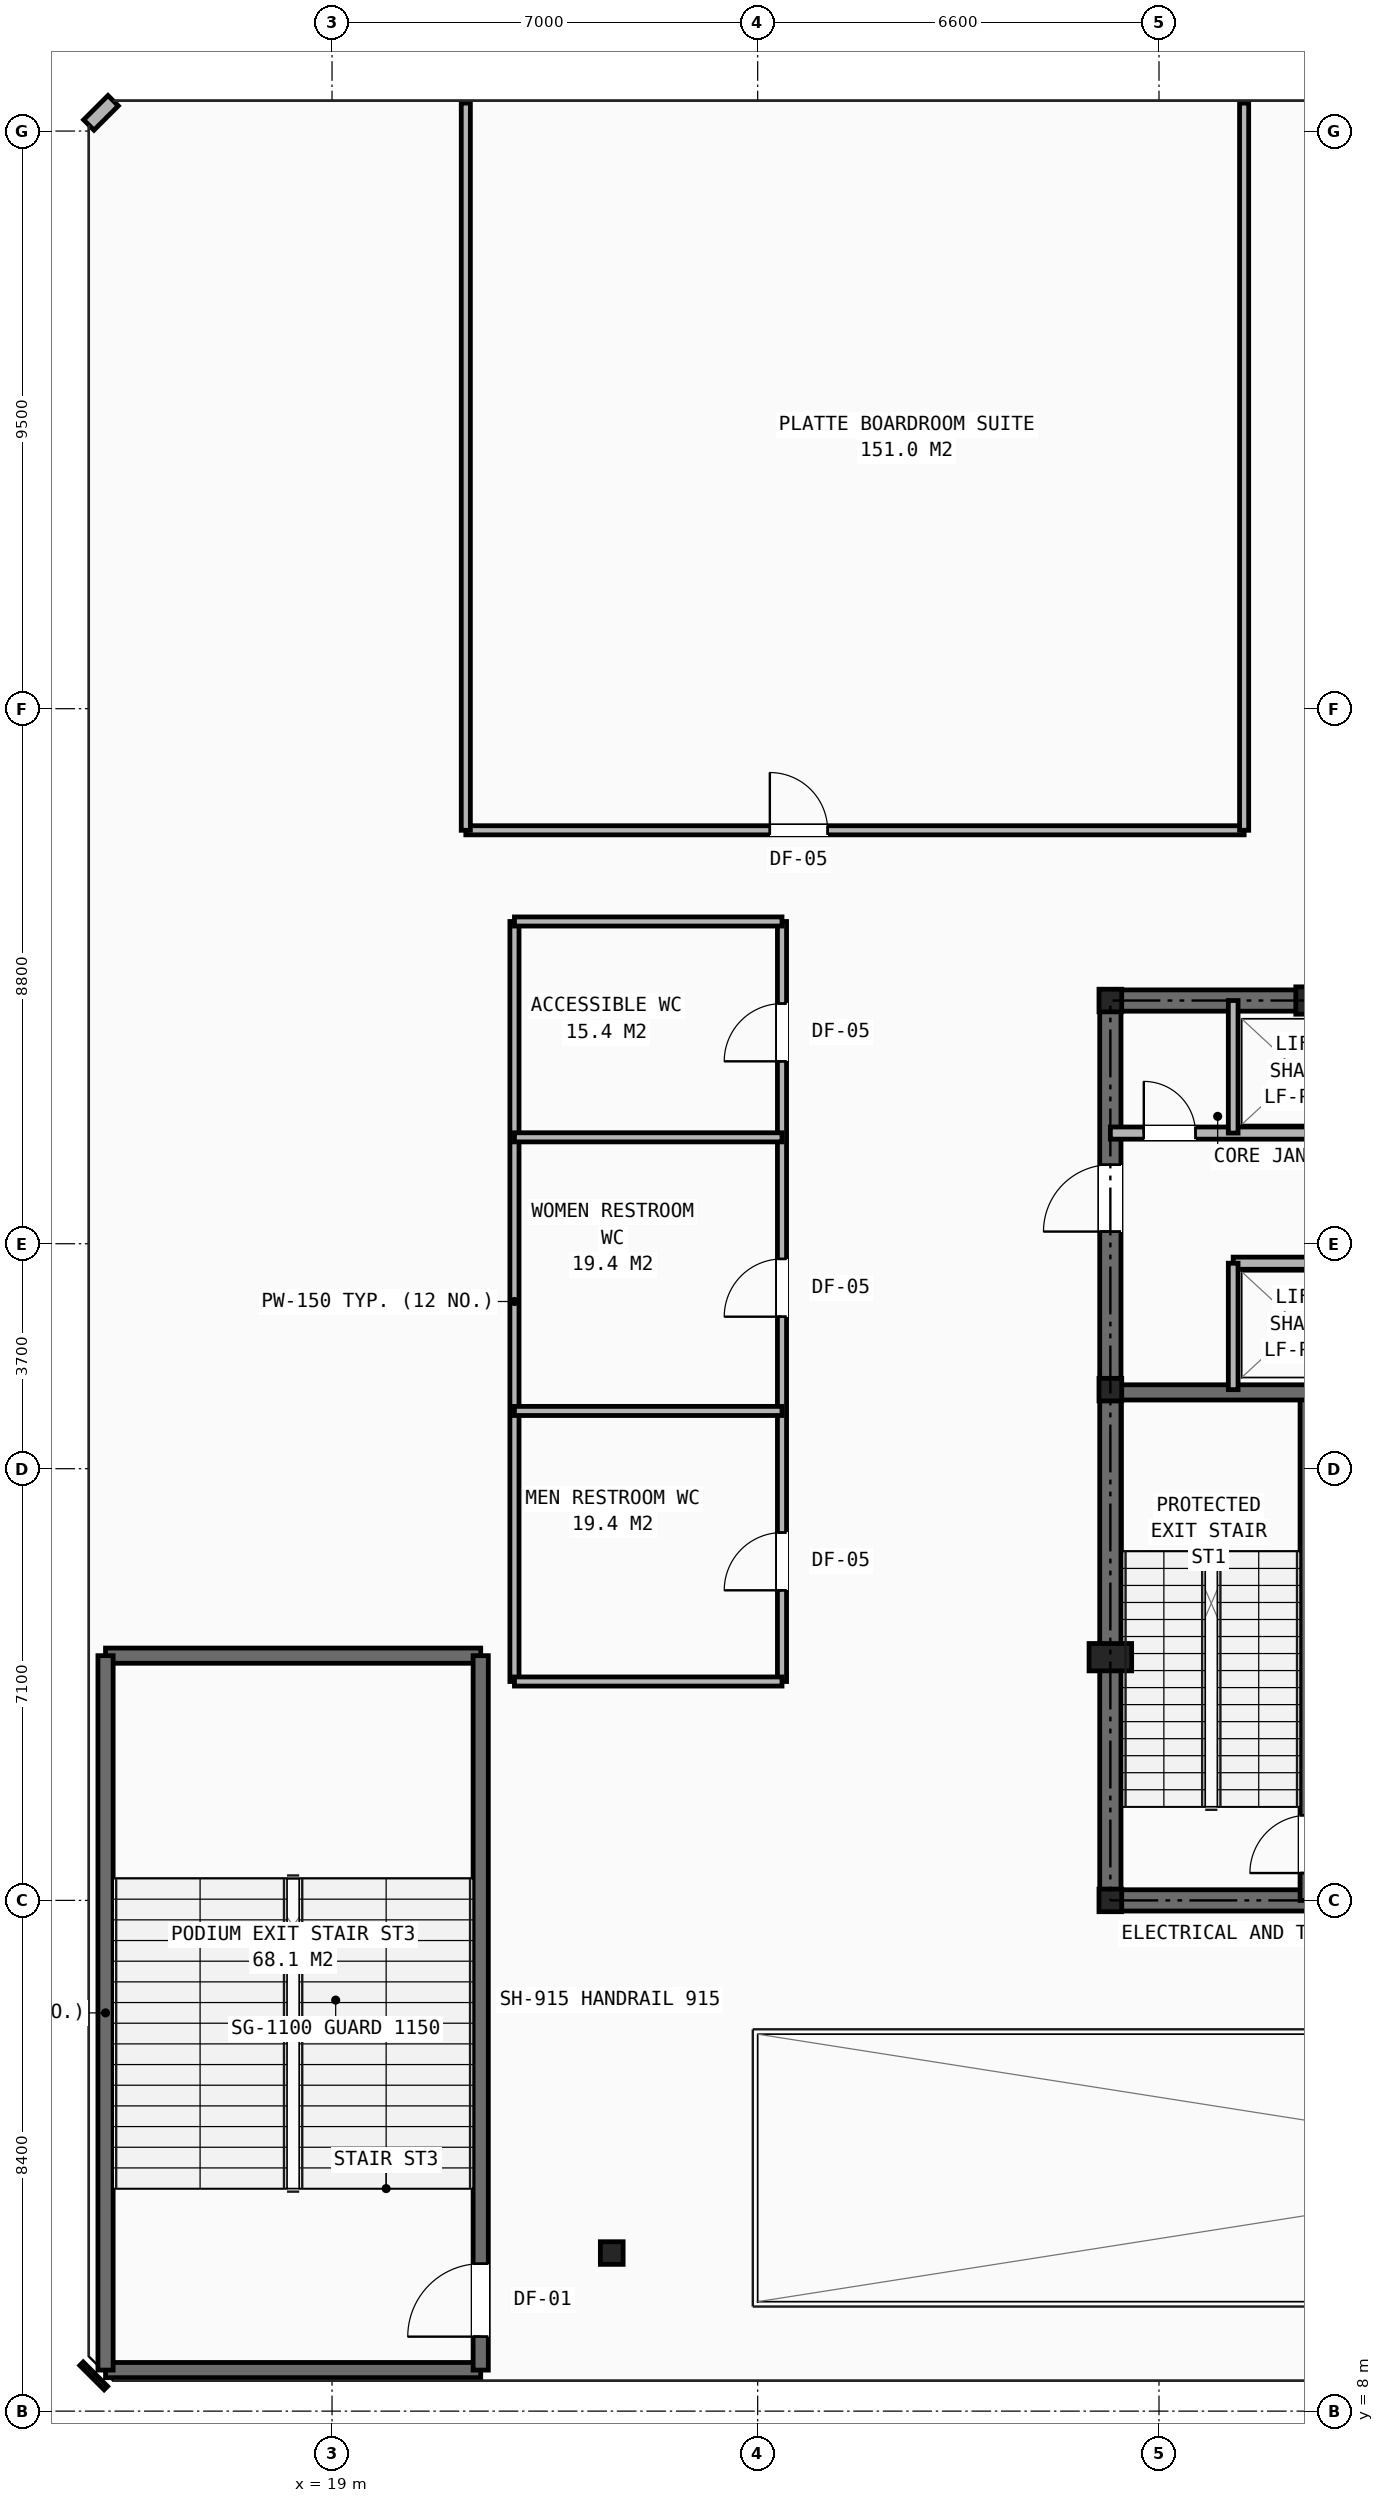
"""IFC4 building model, lengths in metres.
Left out: names, types, materials, properties, quantities, classifications, styles, units other than length and angle.
Written with IfcOpenShell. Run it as: python <this file> out.ifc"""

import sys

from ifc_helpers import new_model, si_unit, direction, frame, frame_2d, origin, origin_2d, place, context, subcontext, project, spatial, rectangle, i_section, extrude, element, fill, save


model = new_model("IFC4")
c1 = context("Model", 3, precision=1e-05, world=origin(), true_north=direction((0.0, 1.0)))
c2 = subcontext(c1, "Body", "Model", "MODEL_VIEW")
j1 = project(units=[si_unit("LENGTHUNIT", "METRE"), si_unit("PLANEANGLEUNIT", "RADIAN")], contexts=[c1])
p1 = place(None, origin())
s1 = spatial("IfcSite", under=j1, at=p1, CompositionType="ELEMENT")
p2 = place(p1, origin())
s2 = spatial("IfcBuilding", under=s1, at=p2, CompositionType="ELEMENT")
p3 = place(p2, frame((0.0, 0.0, 5.5)))
s3 = spatial("IfcBuildingStorey", under=s2, at=p3, CompositionType="ELEMENT", Elevation=5.5)
for number, where, z_axis, x_axis in (
    (1, (31.8, 16.4, 0.0), (0.0, 0.0, 1.0), (1.0, 0.0, 0.0)),
    (2, (31.8, 24.8, 0.0), (0.0, 0.0, 1.0), (1.0, 0.0, 0.0)),
    (3, (31.8, 31.2, 0.0), (0.0, 0.0, 1.0), (1.0, 0.0, 0.0)),
    (4, (23.6, 10.6, 0.0), (0.0, 0.0, 1.0), (1.0, 0.0, 0.0)),
):
    element("IfcColumn", number, at=place(p3, frame(where, z_axis=z_axis, x_axis=x_axis)), inside=s3, PredefinedType="COLUMN", context=c2, shape_type="SweptSolid", body=[
        extrude(i_section(OverallWidth=0.374, OverallDepth=0.372, WebThickness=0.016, FlangeThickness=0.026, at=origin_2d()), origin(), (0.0, 0.0, 1.0), 5.5),
    ])
for number, where, z_axis, x_axis in (
    (5, (31.8, 20.4, 0.0), (0.0, 0.0, 1.0), (1.0, 0.0, 0.0)),
    (6, (35.2, 31.2, 0.0), (0.0, 0.0, 1.0), (1.0, 0.0, 0.0)),
):
    element("IfcColumn", number, at=place(p3, frame(where, z_axis=z_axis, x_axis=x_axis)), inside=s3, PredefinedType="PILASTER", context=c2, shape_type="SweptSolid", body=[
        extrude(rectangle(XDim=0.7, YDim=0.45, at=origin_2d()), origin(), (0.0, 0.0, 1.0), 5.5),
    ])
p4 = place(p3, frame((15.4, 46.0, 0.0), z_axis=(0.0, 0.0, 1.0), x_axis=(-0.707106781187, -0.707106781187, 0.0)))
e7 = element("IfcWall", 7, at=p4, inside=s3, PredefinedType="STANDARD", context=c2, shape_type="SweptSolid", body=[
    extrude(rectangle(XDim=0.565, YDim=0.24, at=frame_2d((0.283, 0.0))), origin(), (0.0, 0.0, 1.0), 5.18),
])
p5 = place(p3, frame((14.88, 8.78, 0.0), z_axis=(0.0, 0.0, 1.0), x_axis=(0.707106781187, -0.707106781187, 0.0)))
e8 = element("IfcWall", 8, at=p5, inside=s3, PredefinedType="STANDARD", context=c2, shape_type="SweptSolid", body=[
    extrude(rectangle(XDim=0.565, YDim=0.08, at=frame_2d((0.283, 0.0))), origin(), (0.0, 0.0, 1.0), 5.18),
])
p6 = place(p3, frame((31.8, 16.4, 0.0), z_axis=(0.0, 0.0, 1.0), x_axis=(1.0, 0.0, 0.0)))
e9 = element("IfcWall", 9, at=p6, inside=s3, PredefinedType="SHEAR", context=c2, shape_type="SweptSolid", body=[
    extrude(rectangle(XDim=16.4, YDim=0.35, at=frame_2d((8.2, 0.0))), origin(), (0.0, 0.0, 1.0), 5.18),
])
p7 = place(p6, frame((7.75, 0.0, 0.0)))
e10 = element("IfcOpeningElement", 10, at=p7, cuts=e9, PredefinedType="OPENING", context=c2, shape_type="SweptSolid", body=[
    extrude(rectangle(XDim=0.9, YDim=2.1, at=frame_2d((0.45, 1.05))), frame((0.0, 0.185, 0.0), z_axis=(0.0, -1.0, 0.0), x_axis=(1.0, 0.0, 0.0)), (0.0, 0.0, 1.0), 0.37),
])
p8 = place(p6, frame((4.2, 0.0, 0.0)))
e11 = element("IfcOpeningElement", 11, at=p8, cuts=e9, PredefinedType="OPENING", context=c2, shape_type="SweptSolid", body=[
    extrude(rectangle(XDim=0.95, YDim=2.1, at=frame_2d((0.475, 1.05))), frame((0.0, 0.185, 0.0), z_axis=(0.0, -1.0, 0.0), x_axis=(1.0, 0.0, 0.0)), (0.0, 0.0, 1.0), 0.37),
])
p9 = place(p6, frame((10.6, 0.0, 0.0)))
e12 = element("IfcOpeningElement", 12, at=p9, cuts=e9, PredefinedType="OPENING", context=c2, shape_type="SweptSolid", body=[
    extrude(rectangle(XDim=0.95, YDim=2.1, at=frame_2d((0.475, 1.05))), frame((0.0, 0.185, 0.0), z_axis=(0.0, -1.0, 0.0), x_axis=(1.0, 0.0, 0.0)), (0.0, 0.0, 1.0), 0.37),
])
p10 = place(p3, frame((31.8, 31.2, 0.0), z_axis=(0.0, 0.0, 1.0), x_axis=(1.0, 0.0, 0.0)))
e13 = element("IfcWall", 13, at=p10, inside=s3, PredefinedType="SHEAR", context=c2, shape_type="SweptSolid", body=[
    extrude(rectangle(XDim=16.4, YDim=0.35, at=frame_2d((8.2, 0.0))), origin(), (0.0, 0.0, 1.0), 5.18),
])
p11 = place(p3, frame((31.8, 16.4, 0.0), z_axis=(0.0, 0.0, 1.0), x_axis=(0.0, 1.0, 0.0)))
e14 = element("IfcWall", 14, at=p11, inside=s3, PredefinedType="SHEAR", context=c2, shape_type="SweptSolid", body=[
    extrude(rectangle(XDim=14.8, YDim=0.35, at=frame_2d((7.4, 0.0))), origin(), (0.0, 0.0, 1.0), 5.18),
])
p12 = place(p11, frame((11.0, 0.0, 0.0)))
e15 = element("IfcOpeningElement", 15, at=p12, cuts=e14, PredefinedType="OPENING", context=c2, shape_type="SweptSolid", body=[
    extrude(rectangle(XDim=1.1, YDim=2.15, at=frame_2d((0.55, 1.075))), frame((0.0, 0.185, 0.0), z_axis=(0.0, -1.0, 0.0), x_axis=(1.0, 0.0, 0.0)), (0.0, 0.0, 1.0), 0.37),
])
p13 = place(p3, frame((35.045, 16.4, 0.0), z_axis=(0.0, 0.0, 1.0), x_axis=(0.0, 1.0, 0.0)))
e16 = element("IfcWall", 16, at=p13, inside=s3, PredefinedType="SHEAR", context=c2, shape_type="SweptSolid", body=[
    extrude(rectangle(XDim=8.4, YDim=0.25, at=frame_2d((4.2, 0.0))), origin(), (0.0, 0.0, 1.0), 5.18),
])
p14 = place(p13, frame((0.45, 0.0, 0.0)))
e17 = element("IfcOpeningElement", 17, at=p14, cuts=e16, PredefinedType="OPENING", context=c2, shape_type="SweptSolid", body=[
    extrude(rectangle(XDim=0.95, YDim=2.1, at=frame_2d((0.475, 1.05))), frame((0.0, 0.135, 0.0), z_axis=(0.0, -1.0, 0.0), x_axis=(1.0, 0.0, 0.0)), (0.0, 0.0, 1.0), 0.27),
])
p15 = place(p3, frame((31.8, 24.755, 0.0), z_axis=(0.0, 0.0, 1.0), x_axis=(1.0, 0.0, 0.0)))
e18 = element("IfcWall", 18, at=p15, inside=s3, PredefinedType="SHEAR", context=c2, shape_type="SweptSolid", body=[
    extrude(rectangle(XDim=3.245, YDim=0.25, at=frame_2d((1.623, 0.0))), origin(), (0.0, 0.0, 1.0), 5.18),
])
p16 = place(p3, frame((31.8, 29.02, 0.0), z_axis=(0.0, 0.0, 1.0), x_axis=(1.0, 0.0, 0.0)))
e19 = element("IfcWall", 19, at=p16, inside=s3, PredefinedType="SOLIDWALL", context=c2, shape_type="SweptSolid", body=[
    extrude(rectangle(XDim=16.4, YDim=0.2, at=frame_2d((8.2, 0.0))), origin(), (0.0, 0.0, 1.0), 4.631),
])
p17 = place(p16, frame((0.55, 0.0, 0.0)))
e20 = element("IfcOpeningElement", 20, at=p17, cuts=e19, PredefinedType="OPENING", context=c2, shape_type="SweptSolid", body=[
    extrude(rectangle(XDim=0.85, YDim=2.05, at=frame_2d((0.425, 1.025))), frame((0.0, 0.11, 0.0), z_axis=(0.0, -1.0, 0.0), x_axis=(1.0, 0.0, 0.0)), (0.0, 0.0, 1.0), 0.22),
])
p18 = place(p3, frame((33.82, 26.88, 0.0), z_axis=(0.0, 0.0, 1.0), x_axis=(1.0, 0.0, 0.0)))
e21 = element("IfcWall", 21, at=p18, inside=s3, PredefinedType="SOLIDWALL", context=c2, shape_type="SweptSolid", body=[
    extrude(rectangle(XDim=14.38, YDim=0.2, at=frame_2d((7.19, 0.0))), origin(), (0.0, 0.0, 1.0), 4.631),
])
p19 = place(p3, frame((33.82, 29.02, 0.0), z_axis=(0.0, 0.0, 1.0), x_axis=(0.0, 1.0, 0.0)))
e22 = element("IfcWall", 22, at=p19, inside=s3, PredefinedType="SOLIDWALL", context=c2, shape_type="SweptSolid", body=[
    extrude(rectangle(XDim=2.18, YDim=0.16, at=frame_2d((1.09, 0.0))), origin(), (0.0, 0.0, 1.0), 4.631),
])
p20 = place(p3, frame((33.82, 24.8, 0.0), z_axis=(0.0, 0.0, 1.0), x_axis=(0.0, 1.0, 0.0)))
e23 = element("IfcWall", 23, at=p20, inside=s3, PredefinedType="SOLIDWALL", context=c2, shape_type="SweptSolid", body=[
    extrude(rectangle(XDim=2.08, YDim=0.16, at=frame_2d((1.04, 0.0))), origin(), (0.0, 0.0, 1.0), 5.18),
])
for number, where, z_axis, x_axis in (
    (24, (15.275, 20.425, 0.0), (0.0, 0.0, 1.0), (1.0, 0.0, 0.0)),
    (25, (15.275, 8.675, 0.0), (0.0, 0.0, 1.0), (1.0, 0.0, 0.0)),
):
    element("IfcWall", number, at=place(p3, frame(where, z_axis=z_axis, x_axis=x_axis)), inside=s3, PredefinedType="SHEAR", context=c2, shape_type="SweptSolid", body=[
        extrude(rectangle(XDim=6.17, YDim=0.25, at=frame_2d((3.085, 0.0))), origin(), (0.0, 0.0, 1.0), 5.18),
    ])
p21 = place(p3, frame((15.275, 8.675, 0.0), z_axis=(0.0, 0.0, 1.0), x_axis=(0.0, 1.0, 0.0)))
e26 = element("IfcWall", 26, at=p21, inside=s3, PredefinedType="SHEAR", context=c2, shape_type="SweptSolid", body=[
    extrude(rectangle(XDim=11.75, YDim=0.25, at=frame_2d((5.875, 0.0))), origin(), (0.0, 0.0, 1.0), 5.18),
])
p22 = place(p3, frame((21.445, 8.675, 0.0), z_axis=(0.0, 0.0, 1.0), x_axis=(0.0, 1.0, 0.0)))
e27 = element("IfcWall", 27, at=p22, inside=s3, PredefinedType="SHEAR", context=c2, shape_type="SweptSolid", body=[
    extrude(rectangle(XDim=11.75, YDim=0.25, at=frame_2d((5.875, 0.0))), origin(), (0.0, 0.0, 1.0), 5.18),
])
p23 = place(p22, frame((0.55, 0.0, 0.0)))
e28 = element("IfcOpeningElement", 28, at=p23, cuts=e27, PredefinedType="OPENING", context=c2, shape_type="SweptSolid", body=[
    extrude(rectangle(XDim=1.2, YDim=2.15, at=frame_2d((0.6, 1.075))), frame((0.0, 0.135, 0.0), z_axis=(0.0, -1.0, 0.0), x_axis=(1.0, 0.0, 0.0)), (0.0, 0.0, 1.0), 0.27),
])
p24 = place(p3, frame((21.2, 34.0, 0.0), z_axis=(0.0, 0.0, 1.0), x_axis=(1.0, 0.0, 0.0)))
e29 = element("IfcWall", 29, at=p24, inside=s3, PredefinedType="PARTITIONING", context=c2, shape_type="SweptSolid", body=[
    extrude(rectangle(XDim=12.8, YDim=0.15, at=frame_2d((6.4, 0.0))), origin(), (0.0, 0.0, 1.0), 4.195),
])
p25 = place(p24, frame((5.0, 0.0, 0.0)))
e30 = element("IfcOpeningElement", 30, at=p25, cuts=e29, PredefinedType="OPENING", context=c2, shape_type="SweptSolid", body=[
    extrude(rectangle(XDim=0.95, YDim=2.1, at=frame_2d((0.475, 1.05))), frame((0.0, 0.085, 0.0), z_axis=(0.0, -1.0, 0.0), x_axis=(1.0, 0.0, 0.0)), (0.0, 0.0, 1.0), 0.17),
])
p26 = place(p3, frame((21.2, 34.0, 0.0), z_axis=(0.0, 0.0, 1.0), x_axis=(0.0, 1.0, 0.0)))
e31 = element("IfcWall", 31, at=p26, inside=s3, PredefinedType="PARTITIONING", context=c2, shape_type="SweptSolid", body=[
    extrude(rectangle(XDim=11.96, YDim=0.15, at=frame_2d((5.98, 0.0))), origin(), (0.0, 0.0, 1.0), 4.195),
])
p27 = place(p3, frame((34.0, 34.0, 0.0), z_axis=(0.0, 0.0, 1.0), x_axis=(0.0, 1.0, 0.0)))
e32 = element("IfcWall", 32, at=p27, inside=s3, PredefinedType="PARTITIONING", context=c2, shape_type="SweptSolid", body=[
    extrude(rectangle(XDim=11.96, YDim=0.15, at=frame_2d((5.98, 0.0))), origin(), (0.0, 0.0, 1.0), 4.631),
])
p28 = place(p3, frame((26.4, 20.0, 0.0), z_axis=(0.0, 0.0, 1.0), x_axis=(0.0, 1.0, 0.0)))
e33 = element("IfcWall", 33, at=p28, inside=s3, PredefinedType="PARTITIONING", context=c2, shape_type="SweptSolid", body=[
    extrude(rectangle(XDim=12.5, YDim=0.15, at=frame_2d((6.25, 0.0))), origin(), (0.0, 0.0, 1.0), 4.195),
])
p29 = place(p28, frame((1.5, 0.0, 0.0)))
e34 = element("IfcOpeningElement", 34, at=p29, cuts=e33, PredefinedType="OPENING", context=c2, shape_type="SweptSolid", body=[
    extrude(rectangle(XDim=0.95, YDim=2.1, at=frame_2d((0.475, 1.05))), frame((0.0, 0.085, 0.0), z_axis=(0.0, -1.0, 0.0), x_axis=(1.0, 0.0, 0.0)), (0.0, 0.0, 1.0), 0.17),
])
p30 = place(p28, frame((6.0, 0.0, 0.0)))
e35 = element("IfcOpeningElement", 35, at=p30, cuts=e33, PredefinedType="OPENING", context=c2, shape_type="SweptSolid", body=[
    extrude(rectangle(XDim=0.95, YDim=2.1, at=frame_2d((0.475, 1.05))), frame((0.0, 0.085, 0.0), z_axis=(0.0, -1.0, 0.0), x_axis=(1.0, 0.0, 0.0)), (0.0, 0.0, 1.0), 0.17),
])
p31 = place(p28, frame((10.2, 0.0, 0.0)))
e36 = element("IfcOpeningElement", 36, at=p31, cuts=e33, PredefinedType="OPENING", context=c2, shape_type="SweptSolid", body=[
    extrude(rectangle(XDim=0.95, YDim=2.1, at=frame_2d((0.475, 1.05))), frame((0.0, 0.085, 0.0), z_axis=(0.0, -1.0, 0.0), x_axis=(1.0, 0.0, 0.0)), (0.0, 0.0, 1.0), 0.17),
])
p32 = place(p3, frame((22.0, 20.0, 0.0), z_axis=(0.0, 0.0, 1.0), x_axis=(0.0, 1.0, 0.0)))
e37 = element("IfcWall", 37, at=p32, inside=s3, PredefinedType="PARTITIONING", context=c2, shape_type="SweptSolid", body=[
    extrude(rectangle(XDim=12.5, YDim=0.15, at=frame_2d((6.25, 0.0))), origin(), (0.0, 0.0, 1.0), 4.195),
])
for number, where, z_axis, x_axis in (
    (38, (22.0, 20.0, 0.0), (0.0, 0.0, 1.0), (1.0, 0.0, 0.0)),
    (39, (22.0, 24.45, 0.0), (0.0, 0.0, 1.0), (1.0, 0.0, 0.0)),
    (40, (22.0, 28.95, 0.0), (0.0, 0.0, 1.0), (1.0, 0.0, 0.0)),
):
    element("IfcWall", number, at=place(p3, frame(where, z_axis=z_axis, x_axis=x_axis)), inside=s3, PredefinedType="PARTITIONING", context=c2, shape_type="SweptSolid", body=[
        extrude(rectangle(XDim=4.4, YDim=0.15, at=frame_2d((2.2, 0.0))), origin(), (0.0, 0.0, 1.0), 5.18),
    ])
p33 = place(p3, frame((22.0, 32.5, 0.0), z_axis=(0.0, 0.0, 1.0), x_axis=(1.0, 0.0, 0.0)))
e41 = element("IfcWall", 41, at=p33, inside=s3, PredefinedType="PARTITIONING", context=c2, shape_type="SweptSolid", body=[
    extrude(rectangle(XDim=4.4, YDim=0.15, at=frame_2d((2.2, 0.0))), origin(), (0.0, 0.0, 1.0), 4.195),
])
p34 = place(p17, origin())
e42 = element("IfcDoor", 42, at=p34, inside=s3, OperationType="SINGLE_SWING_LEFT", PredefinedType="DOOR", context=c2, shape_type="SweptSolid", body=[
    extrude(rectangle(XDim=0.85, YDim=2.05, at=frame_2d((0.425, 1.025))), frame((0.0, 0.025, 0.0), z_axis=(0.0, -1.0, 0.0), x_axis=(1.0, 0.0, 0.0)), (0.0, 0.0, 1.0), 0.05),
])
fill(e20, e42)
p35 = place(p12, origin())
e43 = element("IfcDoor", 43, at=p35, inside=s3, OperationType="SINGLE_SWING_LEFT", PredefinedType="DOOR", context=c2, shape_type="SweptSolid", body=[
    extrude(rectangle(XDim=1.1, YDim=2.15, at=frame_2d((0.55, 1.075))), frame((0.0, 0.025, 0.0), z_axis=(0.0, -1.0, 0.0), x_axis=(1.0, 0.0, 0.0)), (0.0, 0.0, 1.0), 0.05),
])
fill(e15, e43)
p36 = place(p25, origin())
e44 = element("IfcDoor", 44, at=p36, inside=s3, OperationType="SINGLE_SWING_LEFT", PredefinedType="DOOR", context=c2, shape_type="SweptSolid", body=[
    extrude(rectangle(XDim=0.95, YDim=2.1, at=frame_2d((0.475, 1.05))), frame((0.0, 0.025, 0.0), z_axis=(0.0, -1.0, 0.0), x_axis=(1.0, 0.0, 0.0)), (0.0, 0.0, 1.0), 0.05),
])
fill(e30, e44)
p37 = place(p29, origin())
e45 = element("IfcDoor", 45, at=p37, inside=s3, OperationType="SINGLE_SWING_LEFT", PredefinedType="DOOR", context=c2, shape_type="SweptSolid", body=[
    extrude(rectangle(XDim=0.95, YDim=2.1, at=frame_2d((0.475, 1.05))), frame((0.0, 0.025, 0.0), z_axis=(0.0, -1.0, 0.0), x_axis=(1.0, 0.0, 0.0)), (0.0, 0.0, 1.0), 0.05),
])
fill(e34, e45)
p38 = place(p30, origin())
e46 = element("IfcDoor", 46, at=p38, inside=s3, OperationType="SINGLE_SWING_LEFT", PredefinedType="DOOR", context=c2, shape_type="SweptSolid", body=[
    extrude(rectangle(XDim=0.95, YDim=2.1, at=frame_2d((0.475, 1.05))), frame((0.0, 0.025, 0.0), z_axis=(0.0, -1.0, 0.0), x_axis=(1.0, 0.0, 0.0)), (0.0, 0.0, 1.0), 0.05),
])
fill(e35, e46)
p39 = place(p31, origin())
e47 = element("IfcDoor", 47, at=p39, inside=s3, OperationType="SINGLE_SWING_LEFT", PredefinedType="DOOR", context=c2, shape_type="SweptSolid", body=[
    extrude(rectangle(XDim=0.95, YDim=2.1, at=frame_2d((0.475, 1.05))), frame((0.0, 0.025, 0.0), z_axis=(0.0, -1.0, 0.0), x_axis=(1.0, 0.0, 0.0)), (0.0, 0.0, 1.0), 0.05),
])
fill(e36, e47)
p40 = place(p23, origin())
e48 = element("IfcDoor", 48, at=p40, inside=s3, OperationType="SINGLE_SWING_LEFT", PredefinedType="DOOR", context=c2, shape_type="SweptSolid", body=[
    extrude(rectangle(XDim=1.2, YDim=2.15, at=frame_2d((0.6, 1.075))), frame((0.0, 0.025, 0.0), z_axis=(0.0, -1.0, 0.0), x_axis=(1.0, 0.0, 0.0)), (0.0, 0.0, 1.0), 0.05),
])
fill(e28, e48)
save(model, sys.argv[1])
